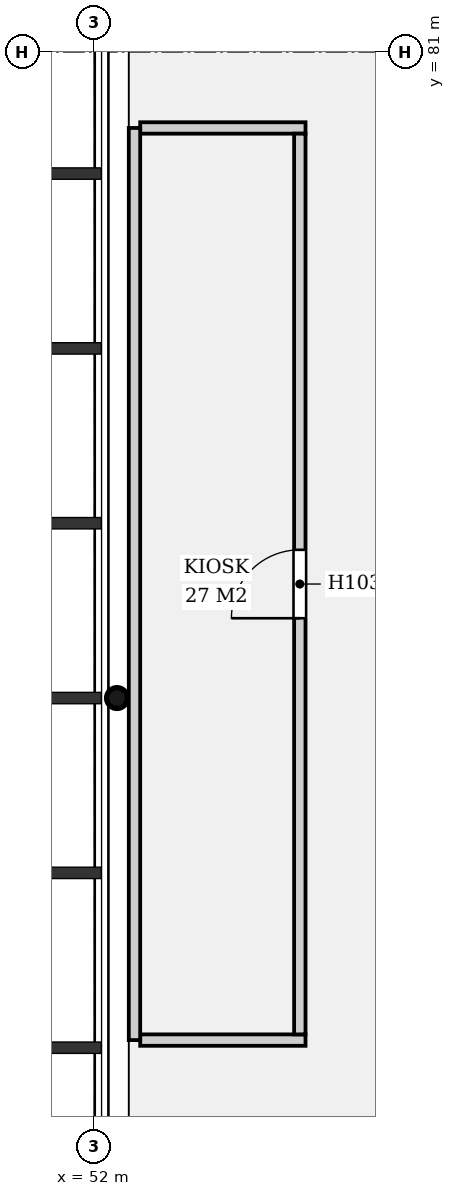
"""IFC4 building model, lengths in metres.
Left out: names, types, materials, properties, quantities, classifications, styles, units other than length and angle.
Written with IfcOpenShell. Run it as: python <this file> out.ifc"""

import sys

from ifc_helpers import new_model, si_unit, direction, frame, frame_2d, origin, origin_2d, place, context, subcontext, project, spatial, rectangle, hollow_circle, extrude, element, fill, save


model = new_model("IFC4")
c1 = context("Model", 3, precision=1e-05, world=origin(), true_north=direction((0.0, 1.0)))
c2 = subcontext(c1, "Body", "Model", "MODEL_VIEW")
j1 = project(units=[si_unit("LENGTHUNIT", "METRE"), si_unit("PLANEANGLEUNIT", "RADIAN")], contexts=[c1])
p1 = place(None, origin())
s1 = spatial("IfcSite", under=j1, at=p1, CompositionType="ELEMENT")
p2 = place(p1, origin())
s2 = spatial("IfcBuilding", under=s1, at=p2, CompositionType="ELEMENT")
p3 = place(p2, frame((0.0, 0.0, 5.0)))
s3 = spatial("IfcBuildingStorey", under=s2, at=p3, CompositionType="ELEMENT", Elevation=5.0)
p4 = place(p3, frame((52.294, 72.5, 0.027), z_axis=(-0.19937683017, 0.0, 0.979922894717), x_axis=(0.0, -1.0, 0.0)))
e1 = element("IfcColumn", 1, at=p4, inside=s3, PredefinedType="COLUMN", context=c2, shape_type="SweptSolid", body=[
    extrude(hollow_circle(Radius=0.136, WallThickness=0.013, at=origin_2d()), origin(), (0.0, 0.0, 1.0), 4.462),
])
p5 = place(p3, frame((54.7, 68.075, 0.0), z_axis=(0.0, 0.0, 1.0), x_axis=(0.0, 1.0, 0.0)))
e2 = element("IfcWall", 2, at=p5, inside=s3, PredefinedType="PARTITIONING", context=c2, shape_type="SweptSolid", body=[
    extrude(rectangle(XDim=11.85, YDim=0.15, at=frame_2d((5.925, 0.0))), origin(), (0.0, 0.0, 1.0), 4.15),
])
p6 = place(p5, frame((5.475, 0.0, 0.0)))
e3 = element("IfcOpeningElement", 3, at=p6, cuts=e2, PredefinedType="OPENING", context=c2, shape_type="SweptSolid", body=[
    extrude(rectangle(XDim=0.9, YDim=2.1, at=frame_2d((0.45, 1.05))), frame((0.0, 0.085, 0.0), z_axis=(0.0, -1.0, 0.0), x_axis=(1.0, 0.0, 0.0)), (0.0, 0.0, 1.0), 0.17),
])
for number, where, z_axis, x_axis in (
    (4, (52.6, 68.0, 0.0), (0.0, 0.0, 1.0), (1.0, 0.0, 0.0)),
    (5, (52.6, 80.0, 0.0), (0.0, 0.0, 1.0), (1.0, 0.0, 0.0)),
):
    element("IfcWall", number, at=place(p3, frame(where, z_axis=z_axis, x_axis=x_axis)), inside=s3, PredefinedType="PARTITIONING", context=c2, shape_type="SweptSolid", body=[
        extrude(rectangle(XDim=2.175, YDim=0.15, at=frame_2d((1.087, 0.0))), origin(), (0.0, 0.0, 1.0), 4.15),
    ])
p7 = place(p3, frame((52.525, 68.0, 0.0), z_axis=(0.0, 0.0, 1.0), x_axis=(0.0, 1.0, 0.0)))
e6 = element("IfcWall", 6, at=p7, inside=s3, PredefinedType="PARTITIONING", context=c2, shape_type="SweptSolid", body=[
    extrude(rectangle(XDim=12.0, YDim=0.15, at=frame_2d((6.0, 0.0))), origin(), (0.0, 0.0, 1.0), 4.15),
])
p8 = place(p6, origin())
e7 = element("IfcDoor", 7, at=p8, inside=s3, OperationType="SINGLE_SWING_LEFT", PredefinedType="DOOR", context=c2, shape_type="SweptSolid", body=[
    extrude(rectangle(XDim=0.9, YDim=2.1, at=frame_2d((0.45, 1.05))), frame((0.0, 0.025, 0.0), z_axis=(0.0, -1.0, 0.0), x_axis=(1.0, 0.0, 0.0)), (0.0, 0.0, 1.0), 0.05),
])
fill(e3, e7)
save(model, sys.argv[1])
